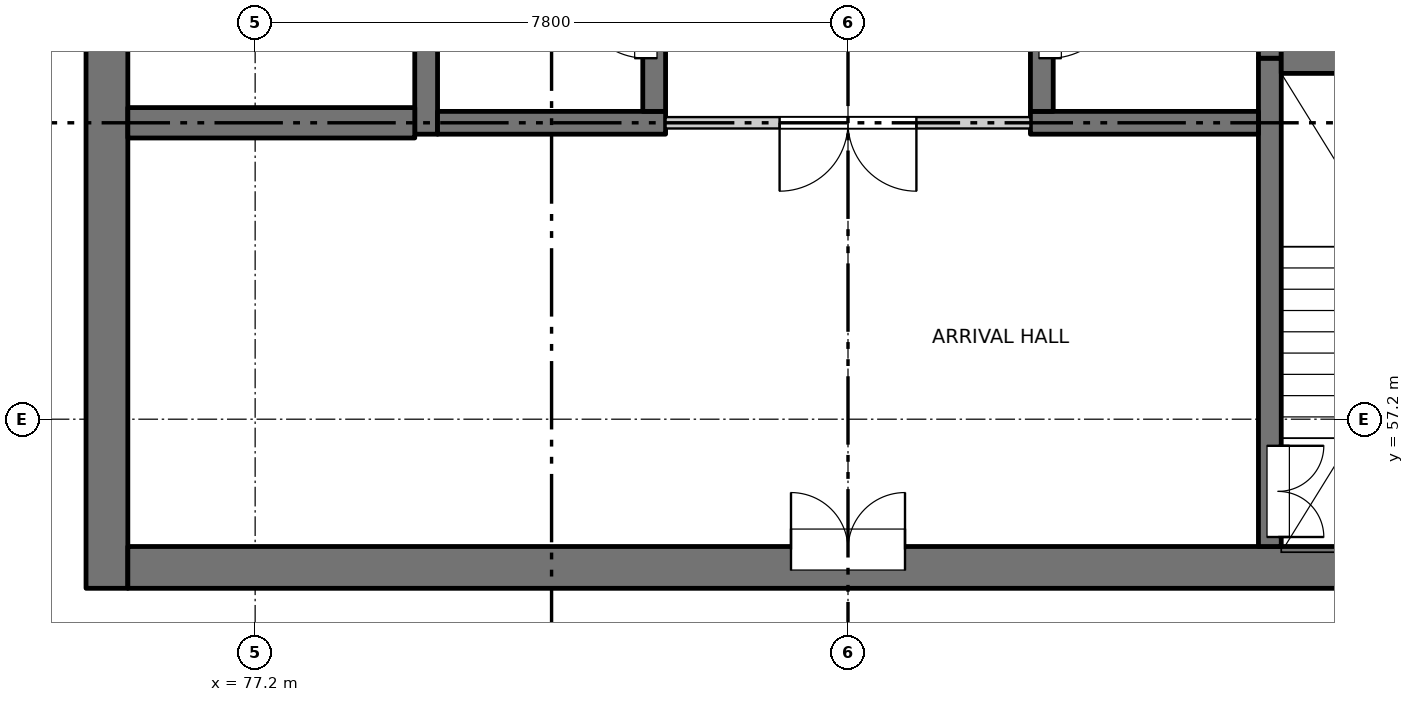
"""IFC4 building model, lengths in metres.
Left out: names, types, materials, properties, quantities, classifications, styles, units other than length and angle.
Written with IfcOpenShell. Run it as: python <this file> out.ifc"""

import sys

from ifc_helpers import new_model, si_unit, direction, frame, frame_2d, origin, place, context, subcontext, project, spatial, rectangle, extrude, element, fill, save


model = new_model("IFC4")
c1 = context("Model", 3, precision=1e-05, world=origin(), true_north=direction((0.0, 1.0)))
c2 = subcontext(c1, "Body", "Model", "MODEL_VIEW")
j1 = project(units=[si_unit("LENGTHUNIT", "METRE"), si_unit("PLANEANGLEUNIT", "RADIAN")], contexts=[c1])
p1 = place(None, origin())
s1 = spatial("IfcSite", under=j1, at=p1, CompositionType="ELEMENT")
p2 = place(p1, origin())
s2 = spatial("IfcBuilding", under=s1, at=p2, CompositionType="ELEMENT")
p3 = place(p2, frame((0.0, 0.0, 169.0)))
s3 = spatial("IfcBuildingStorey", under=s2, at=p3, CompositionType="ELEMENT", Elevation=169.0)
p4 = place(p3, frame((75.25, 54.975, -0.25), z_axis=(0.0, 0.0, 1.0), x_axis=(0.0, 1.0, 0.0)))
e1 = element("IfcWall", 1, at=p4, inside=s3, PredefinedType="SOLIDWALL", context=c2, shape_type="SweptSolid", body=[
    extrude(rectangle(XDim=22.325, YDim=0.55, at=frame_2d((11.163, 0.0))), origin(), (0.0, 0.0, 1.0), 3.35),
])
p5 = place(p4, frame((7.475, 0.0, 0.25)))
e2 = element("IfcOpeningElement", 2, at=p5, cuts=e1, PredefinedType="OPENING", context=c2, shape_type="SweptSolid", body=[
    extrude(rectangle(XDim=0.9, YDim=2.1, at=frame_2d((0.45, 1.05))), frame((0.0, 0.285, 0.0), z_axis=(0.0, -1.0, 0.0), x_axis=(1.0, 0.0, 0.0)), (0.0, 0.0, 1.0), 0.57),
])
p6 = place(p4, frame((10.775, 0.0, 0.25)))
e3 = element("IfcOpeningElement", 3, at=p6, cuts=e1, PredefinedType="OPENING", context=c2, shape_type="SweptSolid", body=[
    extrude(rectangle(XDim=0.9, YDim=2.1, at=frame_2d((0.45, 1.05))), frame((0.0, 0.285, 0.0), z_axis=(0.0, -1.0, 0.0), x_axis=(1.0, 0.0, 0.0)), (0.0, 0.0, 1.0), 0.57),
])
p7 = place(p4, frame((13.775, 0.0, 0.25)))
e4 = element("IfcOpeningElement", 4, at=p7, cuts=e1, PredefinedType="OPENING", context=c2, shape_type="SweptSolid", body=[
    extrude(rectangle(XDim=0.9, YDim=2.1, at=frame_2d((0.45, 1.05))), frame((0.0, 0.285, 0.0), z_axis=(0.0, -1.0, 0.0), x_axis=(1.0, 0.0, 0.0)), (0.0, 0.0, 1.0), 0.57),
])
p8 = place(p4, frame((16.775, 0.0, 0.25)))
e5 = element("IfcOpeningElement", 5, at=p8, cuts=e1, PredefinedType="OPENING", context=c2, shape_type="SweptSolid", body=[
    extrude(rectangle(XDim=0.9, YDim=2.1, at=frame_2d((0.45, 1.05))), frame((0.0, 0.285, 0.0), z_axis=(0.0, -1.0, 0.0), x_axis=(1.0, 0.0, 0.0)), (0.0, 0.0, 1.0), 0.57),
])
p9 = place(p4, frame((20.075, 0.0, 0.25)))
e6 = element("IfcOpeningElement", 6, at=p9, cuts=e1, PredefinedType="OPENING", context=c2, shape_type="SweptSolid", body=[
    extrude(rectangle(XDim=0.9, YDim=2.1, at=frame_2d((0.45, 1.05))), frame((0.0, 0.285, 0.0), z_axis=(0.0, -1.0, 0.0), x_axis=(1.0, 0.0, 0.0)), (0.0, 0.0, 1.0), 0.57),
])
p10 = place(p3, frame((75.525, 55.25, -0.25), z_axis=(0.0, 0.0, 1.0), x_axis=(1.0, 0.0, 0.0)))
e7 = element("IfcWall", 7, at=p10, inside=s3, PredefinedType="SOLIDWALL", context=c2, shape_type="SweptSolid", body=[
    extrude(rectangle(XDim=18.95, YDim=0.55, at=frame_2d((9.475, 0.0))), origin(), (0.0, 0.0, 1.0), 3.35),
])
p11 = place(p10, frame((8.725, 0.0, 0.25)))
e8 = element("IfcOpeningElement", 8, at=p11, cuts=e7, PredefinedType="OPENING", context=c2, shape_type="SweptSolid", body=[
    extrude(rectangle(XDim=1.5, YDim=2.1, at=frame_2d((0.75, 1.05))), frame((0.0, 0.285, 0.0), z_axis=(0.0, -1.0, 0.0), x_axis=(1.0, 0.0, 0.0)), (0.0, 0.0, 1.0), 0.57),
])
p12 = place(p3, frame((79.45, 60.95, -0.25), z_axis=(0.0, 0.0, 1.0), x_axis=(0.0, 1.0, 0.0)))
e9 = element("IfcWall", 9, at=p12, inside=s3, PredefinedType="SOLIDWALL", context=c2, shape_type="SweptSolid", body=[
    extrude(rectangle(XDim=16.35, YDim=0.3, at=frame_2d((8.175, 0.0))), origin(), (0.0, 0.0, 1.0), 3.35),
])
p13 = place(p3, frame((90.55, 55.525, -0.25), z_axis=(0.0, 0.0, 1.0), x_axis=(0.0, 1.0, 0.0)))
e10 = element("IfcWall", 10, at=p13, inside=s3, PredefinedType="SOLIDWALL", context=c2, shape_type="SweptSolid", body=[
    extrude(rectangle(XDim=6.425, YDim=0.3, at=frame_2d((3.212, 0.0))), origin(), (0.0, 0.0, 1.0), 3.35),
])
p14 = place(p13, frame((0.125, 0.0, 0.25)))
e11 = element("IfcOpeningElement", 11, at=p14, cuts=e10, PredefinedType="OPENING", context=c2, shape_type="SweptSolid", body=[
    extrude(rectangle(XDim=1.2, YDim=2.1, at=frame_2d((0.6, 1.05))), frame((0.0, 0.16, 0.0), z_axis=(0.0, -1.0, 0.0), x_axis=(1.0, 0.0, 0.0)), (0.0, 0.0, 1.0), 0.32),
])
p15 = place(p3, frame((90.55, 61.95, -0.25), z_axis=(0.0, 0.0, 1.0), x_axis=(0.0, 1.0, 0.0)))
e12 = element("IfcWall", 12, at=p15, inside=s3, PredefinedType="SOLIDWALL", context=c2, shape_type="SweptSolid", body=[
    extrude(rectangle(XDim=15.35, YDim=0.3, at=frame_2d((7.675, 0.0))), origin(), (0.0, 0.0, 1.0), 3.35),
])
p16 = place(p3, frame((79.6, 61.1, -0.25), z_axis=(0.0, 0.0, 1.0), x_axis=(1.0, 0.0, 0.0)))
e13 = element("IfcWall", 13, at=p16, inside=s3, PredefinedType="SOLIDWALL", context=c2, shape_type="SweptSolid", body=[
    extrude(rectangle(XDim=3.0, YDim=0.3, at=frame_2d((1.5, 0.0))), origin(), (0.0, 0.0, 1.0), 3.35),
])
p17 = place(p3, frame((82.45, 61.25, -0.25), z_axis=(0.0, 0.0, 1.0), x_axis=(0.0, 1.0, 0.0)))
e14 = element("IfcWall", 14, at=p17, inside=s3, PredefinedType="SOLIDWALL", context=c2, shape_type="SweptSolid", body=[
    extrude(rectangle(XDim=2.3, YDim=0.3, at=frame_2d((1.15, 0.0))), origin(), (0.0, 0.0, 1.0), 3.35),
])
p18 = place(p17, frame((0.7, 0.0, 0.25)))
e15 = element("IfcOpeningElement", 15, at=p18, cuts=e14, PredefinedType="OPENING", context=c2, shape_type="SweptSolid", body=[
    extrude(rectangle(XDim=0.9, YDim=2.1, at=frame_2d((0.45, 1.05))), frame((0.0, 0.16, 0.0), z_axis=(0.0, -1.0, 0.0), x_axis=(1.0, 0.0, 0.0)), (0.0, 0.0, 1.0), 0.32),
])
p19 = place(p3, frame((87.4, 61.1, -0.25), z_axis=(0.0, 0.0, 1.0), x_axis=(1.0, 0.0, 0.0)))
e16 = element("IfcWall", 16, at=p19, inside=s3, PredefinedType="SOLIDWALL", context=c2, shape_type="SweptSolid", body=[
    extrude(rectangle(XDim=3.0, YDim=0.3, at=frame_2d((1.5, 0.0))), origin(), (0.0, 0.0, 1.0), 3.35),
])
p20 = place(p3, frame((87.55, 61.25, -0.25), z_axis=(0.0, 0.0, 1.0), x_axis=(0.0, 1.0, 0.0)))
e17 = element("IfcWall", 17, at=p20, inside=s3, PredefinedType="SOLIDWALL", context=c2, shape_type="SweptSolid", body=[
    extrude(rectangle(XDim=2.3, YDim=0.3, at=frame_2d((1.15, 0.0))), origin(), (0.0, 0.0, 1.0), 3.35),
])
p21 = place(p20, frame((0.7, 0.0, 0.25)))
e18 = element("IfcOpeningElement", 18, at=p21, cuts=e17, PredefinedType="OPENING", context=c2, shape_type="SweptSolid", body=[
    extrude(rectangle(XDim=0.9, YDim=2.1, at=frame_2d((0.45, 1.05))), frame((0.0, 0.16, 0.0), z_axis=(0.0, -1.0, 0.0), x_axis=(1.0, 0.0, 0.0)), (0.0, 0.0, 1.0), 0.32),
])
for number, where, z_axis, x_axis in (
    (19, (75.525, 61.1, -0.25), (0.0, 0.0, 1.0), (1.0, 0.0, 0.0)),
    (20, (90.7, 61.95, -0.25), (0.0, 0.0, 1.0), (1.0, 0.0, 0.0)),
):
    element("IfcWall", number, at=place(p3, frame(where, z_axis=z_axis, x_axis=x_axis)), inside=s3, PredefinedType="SOLIDWALL", context=c2, shape_type="SweptSolid", body=[
        extrude(rectangle(XDim=3.775, YDim=0.4, at=frame_2d((1.888, 0.0))), origin(), (0.0, 0.0, 1.0), 3.35),
    ])
p22 = place(p3, frame((82.6, 61.1, 0.0), z_axis=(0.0, 0.0, 1.0), x_axis=(1.0, 0.0, 0.0)))
e21 = element("IfcWall", 21, at=p22, inside=s3, PredefinedType="PARTITIONING", context=c2, shape_type="SweptSolid", body=[
    extrude(rectangle(XDim=4.8, YDim=0.15, at=frame_2d((2.4, 0.0))), origin(), (0.0, 0.0, 1.0), 3.1),
])
p23 = place(p22, frame((1.5, 0.0, 0.0)))
e22 = element("IfcOpeningElement", 22, at=p23, cuts=e21, PredefinedType="OPENING", context=c2, shape_type="SweptSolid", body=[
    extrude(rectangle(XDim=1.8, YDim=2.1, at=frame_2d((0.9, 1.05))), frame((0.0, 0.085, 0.0), z_axis=(0.0, -1.0, 0.0), x_axis=(1.0, 0.0, 0.0)), (0.0, 0.0, 1.0), 0.17),
])
p24 = place(p11, origin())
e23 = element("IfcDoor", 23, at=p24, inside=s3, OperationType="DOUBLE_DOOR_SINGLE_SWING", PredefinedType="DOOR", context=c2, shape_type="SweptSolid", body=[
    extrude(rectangle(XDim=1.5, YDim=2.1, at=frame_2d((0.75, 1.05))), frame((0.0, 0.26, 0.0), z_axis=(0.0, -1.0, 0.0), x_axis=(1.0, 0.0, 0.0)), (0.0, 0.0, 1.0), 0.05),
])
fill(e8, e23)
p25 = place(p14, origin())
e24 = element("IfcDoor", 24, at=p25, inside=s3, OperationType="DOUBLE_DOOR_SINGLE_SWING", PredefinedType="DOOR", context=c2, shape_type="SweptSolid", body=[
    extrude(rectangle(XDim=1.2, YDim=2.1, at=frame_2d((0.6, 1.05))), frame((0.0, -0.085, 0.0), z_axis=(0.0, -1.0, 0.0), x_axis=(1.0, 0.0, 0.0)), (0.0, 0.0, 1.0), 0.05),
])
fill(e11, e24)
p26 = place(p23, origin())
e25 = element("IfcDoor", 25, at=p26, inside=s3, OperationType="DOUBLE_DOOR_SINGLE_SWING", PredefinedType="DOOR", context=c2, shape_type="SweptSolid", body=[
    extrude(rectangle(XDim=1.8, YDim=2.1, at=frame_2d((0.9, 1.05))), frame((0.0, 0.025, 0.0), z_axis=(0.0, -1.0, 0.0), x_axis=(1.0, 0.0, 0.0)), (0.0, 0.0, 1.0), 0.05),
])
fill(e22, e25)
p27 = place(p18, origin())
e26 = element("IfcDoor", 26, at=p27, inside=s3, OperationType="SINGLE_SWING_RIGHT", PredefinedType="DOOR", context=c2, shape_type="SweptSolid", body=[
    extrude(rectangle(XDim=0.9, YDim=2.1, at=frame_2d((0.45, 1.05))), frame((0.0, 0.135, 0.0), z_axis=(0.0, -1.0, 0.0), x_axis=(1.0, 0.0, 0.0)), (0.0, 0.0, 1.0), 0.05),
])
fill(e15, e26)
p28 = place(p21, origin())
e27 = element("IfcDoor", 27, at=p28, inside=s3, OperationType="SINGLE_SWING_LEFT", PredefinedType="DOOR", context=c2, shape_type="SweptSolid", body=[
    extrude(rectangle(XDim=0.9, YDim=2.1, at=frame_2d((0.45, 1.05))), frame((0.0, -0.085, 0.0), z_axis=(0.0, -1.0, 0.0), x_axis=(1.0, 0.0, 0.0)), (0.0, 0.0, 1.0), 0.05),
])
fill(e18, e27)
save(model, sys.argv[1])
